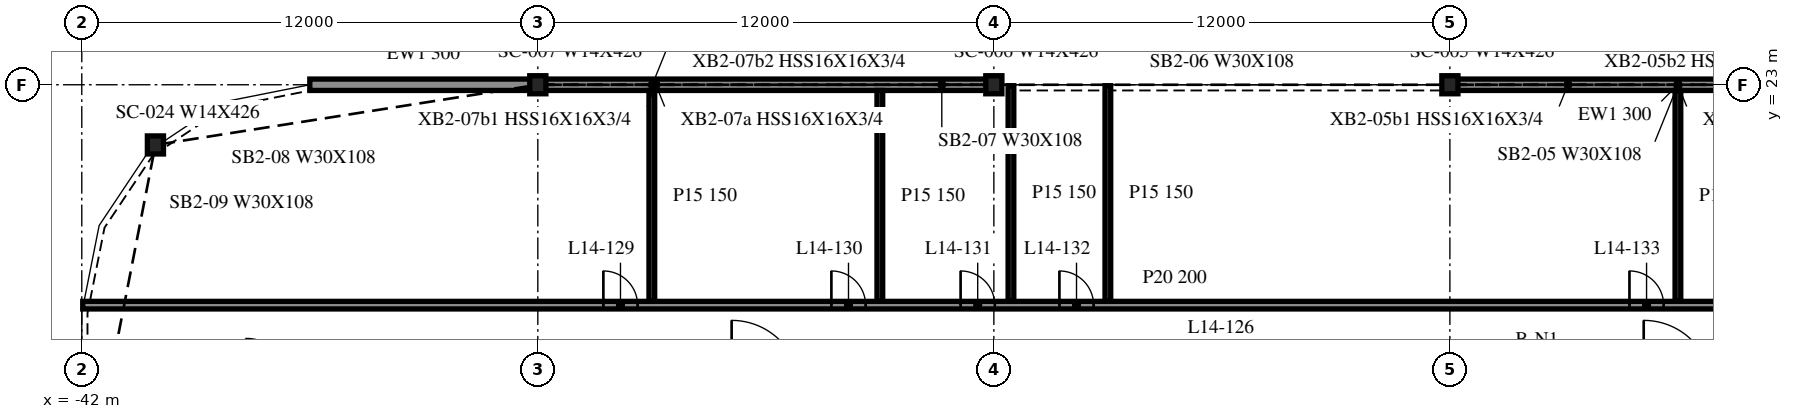
"""IFC4 building model, lengths in metres.
Left out: names, types, materials, properties, quantities, classifications, styles, units other than length and angle.
Written with IfcOpenShell. Run it as: python <this file> out.ifc"""

import sys

from ifc_helpers import new_model, si_unit, direction, frame, frame_2d, origin, origin_2d, place, context, subcontext, project, spatial, rectangle, i_section, extrude, element, fill, save


model = new_model("IFC4")
c1 = context("Model", 3, precision=1e-05, world=origin(), true_north=direction((0.0, 1.0)))
c2 = subcontext(c1, "Body", "Model", "MODEL_VIEW")
j1 = project(units=[si_unit("LENGTHUNIT", "METRE"), si_unit("PLANEANGLEUNIT", "RADIAN")], contexts=[c1])
p1 = place(None, origin())
s1 = spatial("IfcSite", under=j1, at=p1, CompositionType="ELEMENT")
p2 = place(p1, origin())
s2 = spatial("IfcBuilding", under=s1, at=p2, CompositionType="ELEMENT")
p3 = place(p2, frame((0.0, 0.0, 63.2)))
s3 = spatial("IfcBuildingStorey", under=s2, at=p3, CompositionType="ELEMENT", Elevation=63.2)
for number, where, z_axis, x_axis in (
    (1, (-6.0, 23.0, -0.34), (0.0, 0.0, 1.0), (1.0, 0.0, 0.0)),
    (2, (-18.0, 23.0, -0.34), (0.0, 0.0, 1.0), (1.0, 0.0, 0.0)),
    (3, (-30.0, 23.0, -0.34), (0.0, 0.0, 1.0), (1.0, 0.0, 0.0)),
    (4, (-40.062, 21.416, -0.34), (0.0, 0.0, 1.0), (1.0, 0.0, 0.0)),
):
    element("IfcColumn", number, at=place(p3, frame(where, z_axis=z_axis, x_axis=x_axis)), inside=s3, PredefinedType="COLUMN", context=c2, shape_type="SweptSolid", body=[
        extrude(i_section(OverallWidth=0.424, OverallDepth=0.475, WebThickness=0.048, FlangeThickness=0.077, at=origin_2d()), origin(), (0.0, 0.0, 1.0), 4.3),
    ])
for number, where, z_axis, x_axis in (
    (5, (5.976, 23.0, 0.0), (0.0, 0.0, 1.0), (-1.0, 0.0, 0.0)),
    (6, (-18.024, 23.0, 0.0), (0.0, 0.0, 1.0), (-1.0, 0.0, 0.0)),
):
    element("IfcWall", number, at=place(p3, frame(where, z_axis=z_axis, x_axis=x_axis)), inside=s3, PredefinedType="NOTDEFINED", context=c2, shape_type="SweptSolid", body=[
        extrude(rectangle(XDim=11.952, YDim=0.3, at=frame_2d((5.976, 0.0))), origin(), (0.0, 0.0, 1.0), 3.203),
    ])
p4 = place(p3, frame((-30.024, 23.0, 0.0), z_axis=(0.0, 0.0, 1.0), x_axis=(-1.0, 0.0, 0.0)))
e7 = element("IfcWall", 7, at=p4, inside=s3, PredefinedType="NOTDEFINED", context=c2, shape_type="SweptSolid", body=[
    extrude(rectangle(XDim=5.976, YDim=0.3, at=frame_2d((2.988, 0.0))), origin(), (0.0, 0.0, 1.0), 3.203),
])
p5 = place(p3, frame((-41.975, 17.2, 0.0), z_axis=(0.0, 0.0, 1.0), x_axis=(1.0, 0.0, 0.0)))
e8 = element("IfcWall", 8, at=p5, inside=s3, PredefinedType="PARTITIONING", context=c2, shape_type="SweptSolid", body=[
    extrude(rectangle(XDim=95.782, YDim=0.2, at=frame_2d((47.891, 0.0))), origin(), (0.0, 0.0, 1.0), 3.96),
])
p6 = place(p5, frame((13.7, 0.0, 0.0)))
e9 = element("IfcOpeningElement", 9, at=p6, cuts=e8, PredefinedType="OPENING", context=c2, shape_type="SweptSolid", body=[
    extrude(rectangle(XDim=0.9, YDim=2.1, at=frame_2d((0.45, 1.05))), frame((0.0, 0.11, 0.0), z_axis=(0.0, -1.0, 0.0), x_axis=(1.0, 0.0, 0.0)), (0.0, 0.0, 1.0), 0.22),
])
p7 = place(p5, frame((19.7, 0.0, 0.0)))
e10 = element("IfcOpeningElement", 10, at=p7, cuts=e8, PredefinedType="OPENING", context=c2, shape_type="SweptSolid", body=[
    extrude(rectangle(XDim=0.9, YDim=2.1, at=frame_2d((0.45, 1.05))), frame((0.0, 0.11, 0.0), z_axis=(0.0, -1.0, 0.0), x_axis=(1.0, 0.0, 0.0)), (0.0, 0.0, 1.0), 0.22),
])
p8 = place(p5, frame((23.1, 0.0, 0.0)))
e11 = element("IfcOpeningElement", 11, at=p8, cuts=e8, PredefinedType="OPENING", context=c2, shape_type="SweptSolid", body=[
    extrude(rectangle(XDim=0.9, YDim=2.1, at=frame_2d((0.45, 1.05))), frame((0.0, 0.11, 0.0), z_axis=(0.0, -1.0, 0.0), x_axis=(1.0, 0.0, 0.0)), (0.0, 0.0, 1.0), 0.22),
])
p9 = place(p5, frame((25.7, 0.0, 0.0)))
e12 = element("IfcOpeningElement", 12, at=p9, cuts=e8, PredefinedType="OPENING", context=c2, shape_type="SweptSolid", body=[
    extrude(rectangle(XDim=0.9, YDim=2.1, at=frame_2d((0.45, 1.05))), frame((0.0, 0.11, 0.0), z_axis=(0.0, -1.0, 0.0), x_axis=(1.0, 0.0, 0.0)), (0.0, 0.0, 1.0), 0.22),
])
p10 = place(p5, frame((40.7, 0.0, 0.0)))
e13 = element("IfcOpeningElement", 13, at=p10, cuts=e8, PredefinedType="OPENING", context=c2, shape_type="SweptSolid", body=[
    extrude(rectangle(XDim=0.9, YDim=2.1, at=frame_2d((0.45, 1.05))), frame((0.0, 0.11, 0.0), z_axis=(0.0, -1.0, 0.0), x_axis=(1.0, 0.0, 0.0)), (0.0, 0.0, 1.0), 0.22),
])
p11 = place(p5, frame((46.7, 0.0, 0.0)))
e14 = element("IfcOpeningElement", 14, at=p11, cuts=e8, PredefinedType="OPENING", context=c2, shape_type="SweptSolid", body=[
    extrude(rectangle(XDim=0.9, YDim=2.1, at=frame_2d((0.45, 1.05))), frame((0.0, 0.11, 0.0), z_axis=(0.0, -1.0, 0.0), x_axis=(1.0, 0.0, 0.0)), (0.0, 0.0, 1.0), 0.22),
])
p12 = place(p5, frame((48.1, 0.0, 0.0)))
e15 = element("IfcOpeningElement", 15, at=p12, cuts=e8, PredefinedType="OPENING", context=c2, shape_type="SweptSolid", body=[
    extrude(rectangle(XDim=0.9, YDim=2.1, at=frame_2d((0.45, 1.05))), frame((0.0, 0.11, 0.0), z_axis=(0.0, -1.0, 0.0), x_axis=(1.0, 0.0, 0.0)), (0.0, 0.0, 1.0), 0.22),
])
p13 = place(p5, frame((51.5, 0.0, 0.0)))
e16 = element("IfcOpeningElement", 16, at=p13, cuts=e8, PredefinedType="OPENING", context=c2, shape_type="SweptSolid", body=[
    extrude(rectangle(XDim=0.9, YDim=2.1, at=frame_2d((0.45, 1.05))), frame((0.0, 0.11, 0.0), z_axis=(0.0, -1.0, 0.0), x_axis=(1.0, 0.0, 0.0)), (0.0, 0.0, 1.0), 0.22),
])
p14 = place(p5, frame((54.1, 0.0, 0.0)))
e17 = element("IfcOpeningElement", 17, at=p14, cuts=e8, PredefinedType="OPENING", context=c2, shape_type="SweptSolid", body=[
    extrude(rectangle(XDim=0.9, YDim=2.1, at=frame_2d((0.45, 1.05))), frame((0.0, 0.11, 0.0), z_axis=(0.0, -1.0, 0.0), x_axis=(1.0, 0.0, 0.0)), (0.0, 0.0, 1.0), 0.22),
])
p15 = place(p5, frame((69.1, 0.0, 0.0)))
e18 = element("IfcOpeningElement", 18, at=p15, cuts=e8, PredefinedType="OPENING", context=c2, shape_type="SweptSolid", body=[
    extrude(rectangle(XDim=0.9, YDim=2.1, at=frame_2d((0.45, 1.05))), frame((0.0, 0.11, 0.0), z_axis=(0.0, -1.0, 0.0), x_axis=(1.0, 0.0, 0.0)), (0.0, 0.0, 1.0), 0.22),
])
p16 = place(p5, frame((75.1, 0.0, 0.0)))
e19 = element("IfcOpeningElement", 19, at=p16, cuts=e8, PredefinedType="OPENING", context=c2, shape_type="SweptSolid", body=[
    extrude(rectangle(XDim=0.9, YDim=2.1, at=frame_2d((0.45, 1.05))), frame((0.0, 0.11, 0.0), z_axis=(0.0, -1.0, 0.0), x_axis=(1.0, 0.0, 0.0)), (0.0, 0.0, 1.0), 0.22),
])
p17 = place(p5, frame((78.5, 0.0, 0.0)))
e20 = element("IfcOpeningElement", 20, at=p17, cuts=e8, PredefinedType="OPENING", context=c2, shape_type="SweptSolid", body=[
    extrude(rectangle(XDim=0.9, YDim=2.1, at=frame_2d((0.45, 1.05))), frame((0.0, 0.11, 0.0), z_axis=(0.0, -1.0, 0.0), x_axis=(1.0, 0.0, 0.0)), (0.0, 0.0, 1.0), 0.22),
])
p18 = place(p5, frame((81.1, 0.0, 0.0)))
e21 = element("IfcOpeningElement", 21, at=p18, cuts=e8, PredefinedType="OPENING", context=c2, shape_type="SweptSolid", body=[
    extrude(rectangle(XDim=0.9, YDim=2.1, at=frame_2d((0.45, 1.05))), frame((0.0, 0.11, 0.0), z_axis=(0.0, -1.0, 0.0), x_axis=(1.0, 0.0, 0.0)), (0.0, 0.0, 1.0), 0.22),
])
for number, where, z_axis, x_axis in (
    (22, (-27.0, 17.3, 0.0), (0.0, 0.0, 1.0), (0.0, 1.0, 0.0)),
    (23, (-21.0, 17.3, 0.0), (0.0, 0.0, 1.0), (0.0, 1.0, 0.0)),
):
    element("IfcWall", number, at=place(p3, frame(where, z_axis=z_axis, x_axis=x_axis)), inside=s3, PredefinedType="PARTITIONING", context=c2, shape_type="SweptSolid", body=[
        extrude(rectangle(XDim=5.55, YDim=0.15, at=frame_2d((2.775, 0.0))), origin(), (0.0, 0.0, 1.0), 3.96),
    ])
for number, where, z_axis, x_axis in (
    (24, (-17.55, 17.3, 0.0), (0.0, 0.0, 1.0), (0.0, 1.0, 0.0)),
    (25, (-15.0, 17.3, 0.0), (0.0, 0.0, 1.0), (0.0, 1.0, 0.0)),
):
    element("IfcWall", number, at=place(p3, frame(where, z_axis=z_axis, x_axis=x_axis)), inside=s3, PredefinedType="PARTITIONING", context=c2, shape_type="SweptSolid", body=[
        extrude(rectangle(XDim=5.675, YDim=0.15, at=frame_2d((2.837, 0.0))), origin(), (0.0, 0.0, 1.0), 3.96),
    ])
p19 = place(p3, frame((0.0, 17.3, 0.0), z_axis=(0.0, 0.0, 1.0), x_axis=(0.0, 1.0, 0.0)))
e26 = element("IfcWall", 26, at=p19, inside=s3, PredefinedType="PARTITIONING", context=c2, shape_type="SweptSolid", body=[
    extrude(rectangle(XDim=5.55, YDim=0.15, at=frame_2d((2.775, 0.0))), origin(), (0.0, 0.0, 1.0), 3.96),
])
p20 = place(p6, origin())
e27 = element("IfcDoor", 27, at=p20, inside=s3, OperationType="SINGLE_SWING_LEFT", PredefinedType="DOOR", context=c2, shape_type="SweptSolid", body=[
    extrude(rectangle(XDim=0.9, YDim=2.1, at=frame_2d((0.45, 1.05))), frame((0.0, 0.025, 0.0), z_axis=(0.0, -1.0, 0.0), x_axis=(1.0, 0.0, 0.0)), (0.0, 0.0, 1.0), 0.05),
])
fill(e9, e27)
p21 = place(p7, origin())
e28 = element("IfcDoor", 28, at=p21, inside=s3, OperationType="SINGLE_SWING_LEFT", PredefinedType="DOOR", context=c2, shape_type="SweptSolid", body=[
    extrude(rectangle(XDim=0.9, YDim=2.1, at=frame_2d((0.45, 1.05))), frame((0.0, 0.025, 0.0), z_axis=(0.0, -1.0, 0.0), x_axis=(1.0, 0.0, 0.0)), (0.0, 0.0, 1.0), 0.05),
])
fill(e10, e28)
p22 = place(p8, origin())
e29 = element("IfcDoor", 29, at=p22, inside=s3, OperationType="SINGLE_SWING_LEFT", PredefinedType="DOOR", context=c2, shape_type="SweptSolid", body=[
    extrude(rectangle(XDim=0.9, YDim=2.1, at=frame_2d((0.45, 1.05))), frame((0.0, 0.025, 0.0), z_axis=(0.0, -1.0, 0.0), x_axis=(1.0, 0.0, 0.0)), (0.0, 0.0, 1.0), 0.05),
])
fill(e11, e29)
p23 = place(p9, origin())
e30 = element("IfcDoor", 30, at=p23, inside=s3, OperationType="SINGLE_SWING_LEFT", PredefinedType="DOOR", context=c2, shape_type="SweptSolid", body=[
    extrude(rectangle(XDim=0.9, YDim=2.1, at=frame_2d((0.45, 1.05))), frame((0.0, 0.025, 0.0), z_axis=(0.0, -1.0, 0.0), x_axis=(1.0, 0.0, 0.0)), (0.0, 0.0, 1.0), 0.05),
])
fill(e12, e30)
p24 = place(p10, origin())
e31 = element("IfcDoor", 31, at=p24, inside=s3, OperationType="SINGLE_SWING_LEFT", PredefinedType="DOOR", context=c2, shape_type="SweptSolid", body=[
    extrude(rectangle(XDim=0.9, YDim=2.1, at=frame_2d((0.45, 1.05))), frame((0.0, 0.025, 0.0), z_axis=(0.0, -1.0, 0.0), x_axis=(1.0, 0.0, 0.0)), (0.0, 0.0, 1.0), 0.05),
])
fill(e13, e31)
save(model, sys.argv[1])
